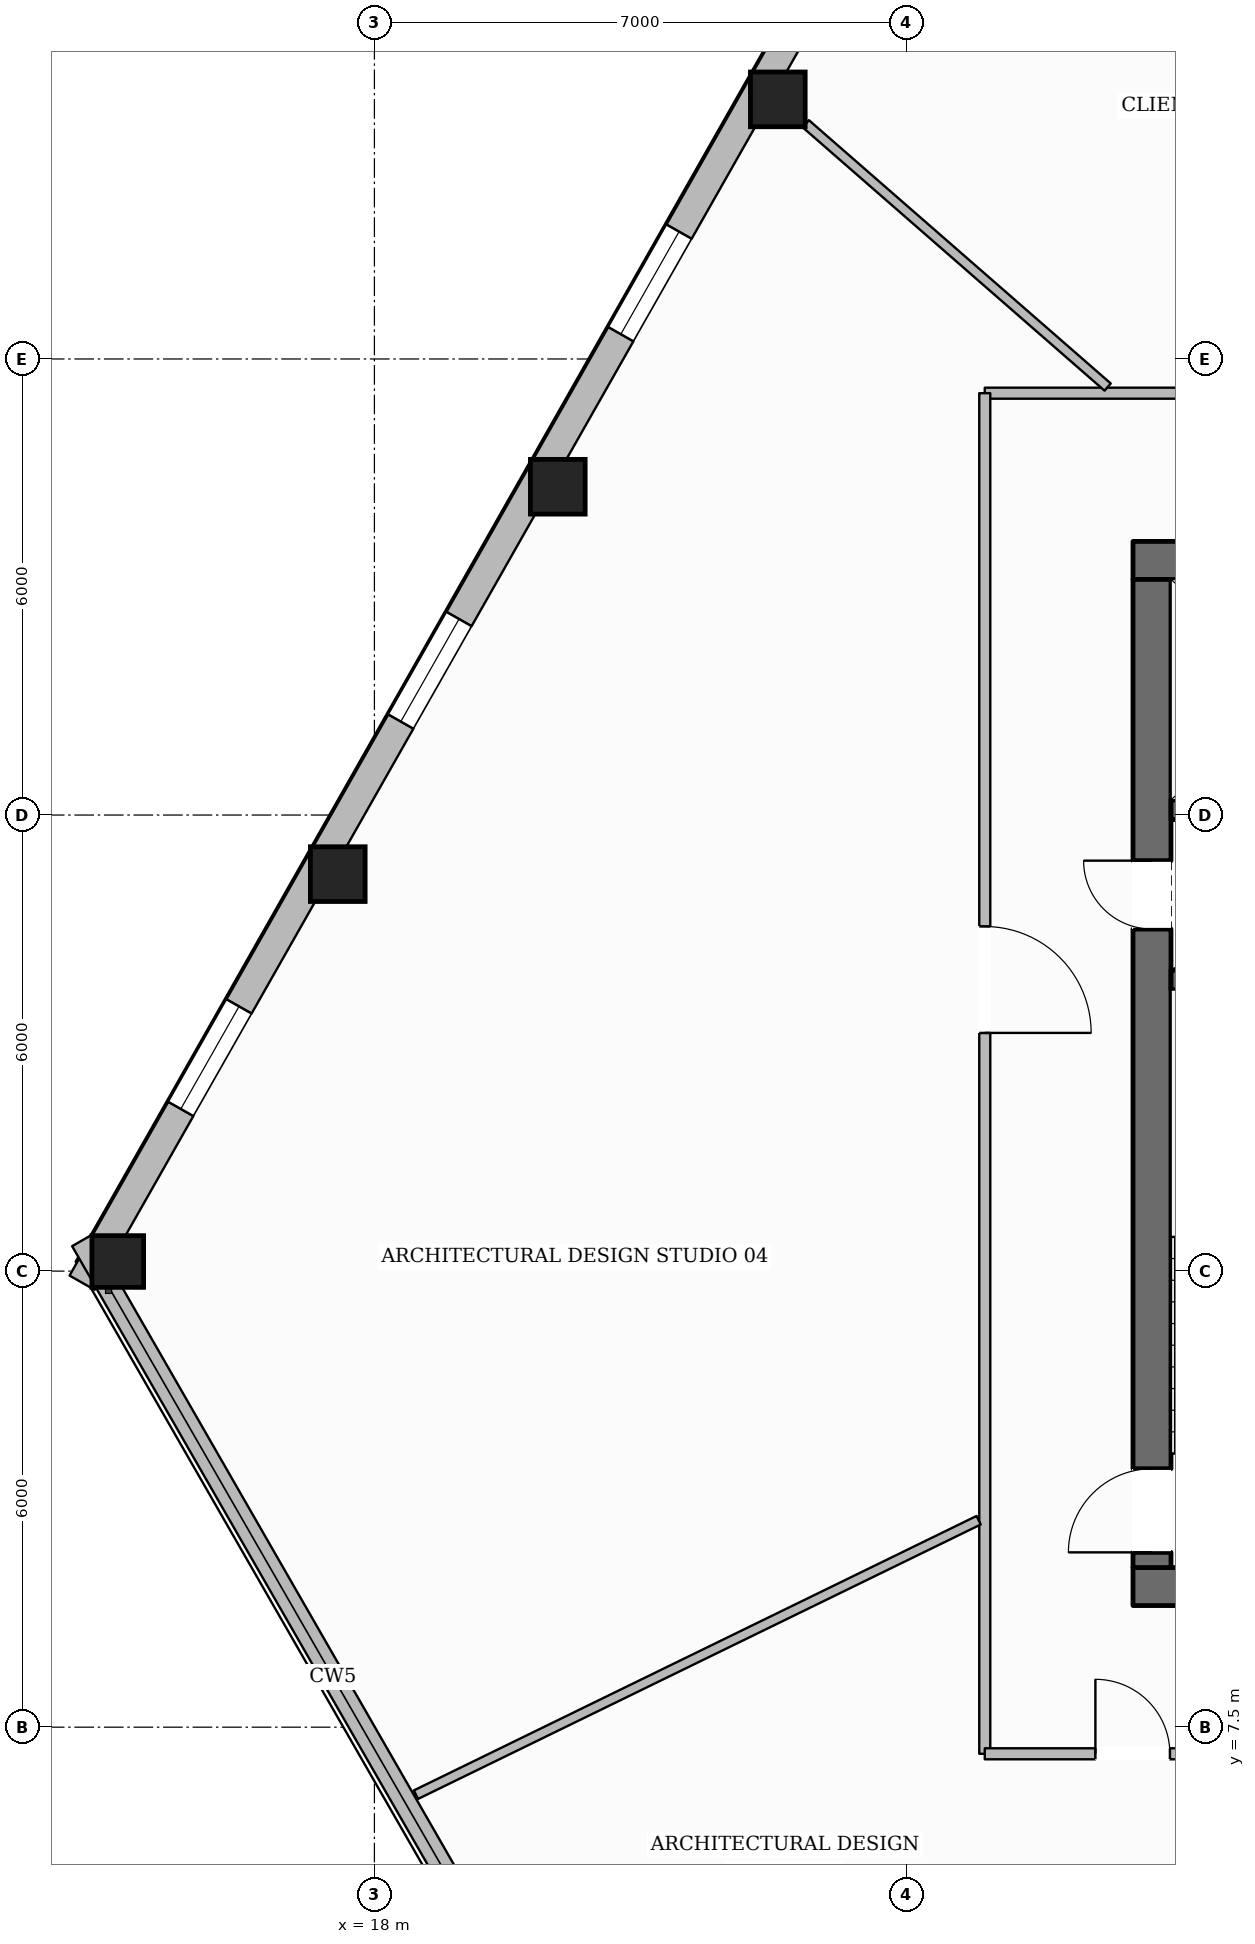
"""IFC4 building model, lengths in metres.
Left out: names, types, materials, properties, quantities, classifications, styles, units other than length and angle.
Written with IfcOpenShell. Run it as: python <this file> out.ifc"""

import sys

from ifc_helpers import new_model, si_unit, direction, frame, frame_2d, origin, origin_2d, place, context, subcontext, project, spatial, rectangle, hollow_rectangle, extrude, element, fill, save


model = new_model("IFC4")
c1 = context("Model", 3, precision=1e-05, world=origin(), true_north=direction((0.0, 1.0)))
c2 = subcontext(c1, "Body", "Model", "MODEL_VIEW")
j1 = project(units=[si_unit("LENGTHUNIT", "METRE"), si_unit("PLANEANGLEUNIT", "RADIAN")], contexts=[c1])
p1 = place(None, origin())
s1 = spatial("IfcSite", under=j1, at=p1, CompositionType="ELEMENT")
p2 = place(p1, origin())
s2 = spatial("IfcBuilding", under=s1, at=p2, CompositionType="ELEMENT")
p3 = place(p2, frame((0.0, 0.0, 100.9)))
s3 = spatial("IfcBuildingStorey", under=s2, at=p3, CompositionType="ELEMENT", Elevation=100.9)
p4 = place(p3, frame((27.98, 9.35, 0.0), z_axis=(0.0, 0.0, 1.0), x_axis=(1.0, 0.0, 0.0)))
e1 = element("IfcWall", 1, at=p4, inside=s3, PredefinedType="SOLIDWALL", context=c2, shape_type="SweptSolid", body=[
    extrude(rectangle(XDim=20.04, YDim=0.5, at=frame_2d((10.02, 0.0))), origin(), (0.0, 0.0, 1.0), 3.6),
])
p5 = place(p4, frame((10.52, 0.0, 0.0)))
e2 = element("IfcOpeningElement", 2, at=p5, cuts=e1, PredefinedType="OPENING", context=c2, shape_type="SweptSolid", body=[
    extrude(rectangle(XDim=1.4, YDim=2.2, at=frame_2d((0.7, 1.1))), frame((0.0, 0.26, 0.0), z_axis=(0.0, -1.0, 0.0), x_axis=(1.0, 0.0, 0.0)), (0.0, 0.0, 1.0), 0.52),
])
p6 = place(p3, frame((27.98, 22.85, 0.0), z_axis=(0.0, 0.0, 1.0), x_axis=(1.0, 0.0, 0.0)))
e3 = element("IfcWall", 3, at=p6, inside=s3, PredefinedType="SOLIDWALL", context=c2, shape_type="SweptSolid", body=[
    extrude(rectangle(XDim=20.04, YDim=0.5, at=frame_2d((10.02, 0.0))), origin(), (0.0, 0.0, 1.0), 3.6),
])
p7 = place(p6, frame((6.295, 0.0, 0.0)))
e4 = element("IfcOpeningElement", 4, at=p7, cuts=e3, PredefinedType="OPENING", context=c2, shape_type="SweptSolid", body=[
    extrude(rectangle(XDim=1.05, YDim=2.15, at=frame_2d((0.525, 1.075))), frame((0.0, 0.26, 0.0), z_axis=(0.0, -1.0, 0.0), x_axis=(1.0, 0.0, 0.0)), (0.0, 0.0, 1.0), 0.52),
])
p8 = place(p6, frame((12.695, 0.0, 0.0)))
e5 = element("IfcOpeningElement", 5, at=p8, cuts=e3, PredefinedType="OPENING", context=c2, shape_type="SweptSolid", body=[
    extrude(rectangle(XDim=1.05, YDim=2.15, at=frame_2d((0.525, 1.075))), frame((0.0, 0.26, 0.0), z_axis=(0.0, -1.0, 0.0), x_axis=(1.0, 0.0, 0.0)), (0.0, 0.0, 1.0), 0.52),
])
p9 = place(p3, frame((28.23, 9.6, 0.0), z_axis=(0.0, 0.0, 1.0), x_axis=(0.0, 1.0, 0.0)))
e6 = element("IfcWall", 6, at=p9, inside=s3, PredefinedType="SOLIDWALL", context=c2, shape_type="SweptSolid", body=[
    extrude(rectangle(XDim=13.0, YDim=0.5, at=frame_2d((6.5, 0.0))), origin(), (0.0, 0.0, 1.0), 3.6),
])
p10 = place(p9, frame((0.2, 0.0, 0.0)))
e7 = element("IfcOpeningElement", 7, at=p10, cuts=e6, PredefinedType="OPENING", context=c2, shape_type="SweptSolid", body=[
    extrude(rectangle(XDim=1.1, YDim=2.15, at=frame_2d((0.55, 1.075))), frame((0.0, 0.26, 0.0), z_axis=(0.0, -1.0, 0.0), x_axis=(1.0, 0.0, 0.0)), (0.0, 0.0, 1.0), 0.52),
])
p11 = place(p9, frame((8.4, 0.0, 0.0)))
e8 = element("IfcOpeningElement", 8, at=p11, cuts=e6, PredefinedType="OPENING", context=c2, shape_type="SweptSolid", body=[
    extrude(rectangle(XDim=0.9, YDim=2.1, at=frame_2d((0.45, 1.05))), frame((0.0, 0.26, 0.0), z_axis=(0.0, -1.0, 0.0), x_axis=(1.0, 0.0, 0.0)), (0.0, 0.0, 1.0), 0.52),
])
for number, where, z_axis, x_axis in (
    (9, (28.48, 17.33, 0.0), (0.0, 0.0, 1.0), (1.0, 0.0, 0.0)),
    (10, (28.48, 19.57, 0.0), (0.0, 0.0, 1.0), (1.0, 0.0, 0.0)),
):
    element("IfcWall", number, at=place(p3, frame(where, z_axis=z_axis, x_axis=x_axis)), inside=s3, PredefinedType="SHEAR", context=c2, shape_type="SweptSolid", body=[
        extrude(rectangle(XDim=3.2, YDim=0.26, at=frame_2d((1.6, 0.0))), origin(), (0.0, 0.0, 1.0), 3.6),
    ])
for number, where, z_axis, x_axis in (
    (11, (23.307, 28.915, 0.0), (0.0, 0.0, 1.0), (1.0, 0.0, 0.0)),
    (12, (20.413, 23.819, 0.0), (0.0, 0.0, 1.0), (1.0, 0.0, 0.0)),
    (13, (17.518, 18.723, 0.0), (0.0, 0.0, 1.0), (1.0, 0.0, 0.0)),
):
    element("IfcColumn", number, at=place(p3, frame(where, z_axis=z_axis, x_axis=x_axis)), inside=s3, PredefinedType="COLUMN", context=c2, shape_type="SweptSolid", body=[
        extrude(hollow_rectangle(XDim=0.72, YDim=0.72, WallThickness=0.032, at=origin_2d()), origin(), (0.0, 0.0, 1.0), 3.6),
    ])
p12 = place(p3, frame((14.624, 13.626, 0.0), z_axis=(0.0, 0.0, 1.0), x_axis=(1.0, 0.0, 0.0)))
e14 = element("IfcColumn", 14, at=p12, inside=s3, PredefinedType="COLUMN", context=c2, shape_type="SweptSolid", body=[
    extrude(hollow_rectangle(XDim=0.68, YDim=0.68, WallThickness=0.03, at=origin_2d()), origin(), (0.0, 0.0, 1.0), 3.6),
])
p13 = place(p3, frame((14.155, 13.347, 0.0), z_axis=(0.0, 0.0, 1.0), x_axis=(0.493868426836, 0.869536644986, 0.0)))
e15 = element("IfcWall", 15, at=p13, inside=s3, PredefinedType="STANDARD", context=c2, shape_type="SweptSolid", body=[
    extrude(rectangle(XDim=36.121, YDim=0.38, at=frame_2d((18.061, 0.0))), origin(), (0.0, 0.0, 1.0), 3.059),
])
p14 = place(p13, frame((31.935, 0.0, 0.65)))
e16 = element("IfcOpeningElement", 16, at=p14, cuts=e15, PredefinedType="OPENING", context=c2, shape_type="SweptSolid", body=[
    extrude(rectangle(XDim=1.55, YDim=1.75, at=frame_2d((0.775, 0.875))), frame((0.0, 0.2, 0.0), z_axis=(0.0, -1.0, 0.0), x_axis=(1.0, 0.0, 0.0)), (0.0, 0.0, 1.0), 0.4),
])
p15 = place(p13, frame((26.073, 0.0, 0.65)))
e17 = element("IfcOpeningElement", 17, at=p15, cuts=e15, PredefinedType="OPENING", context=c2, shape_type="SweptSolid", body=[
    extrude(rectangle(XDim=1.55, YDim=1.75, at=frame_2d((0.775, 0.875))), frame((0.0, 0.2, 0.0), z_axis=(0.0, -1.0, 0.0), x_axis=(1.0, 0.0, 0.0)), (0.0, 0.0, 1.0), 0.4),
])
p16 = place(p13, frame((14.352, 0.0, 0.65)))
e18 = element("IfcOpeningElement", 18, at=p16, cuts=e15, PredefinedType="OPENING", context=c2, shape_type="SweptSolid", body=[
    extrude(rectangle(XDim=1.55, YDim=1.75, at=frame_2d((0.775, 0.875))), frame((0.0, 0.2, 0.0), z_axis=(0.0, -1.0, 0.0), x_axis=(1.0, 0.0, 0.0)), (0.0, 0.0, 1.0), 0.4),
])
p17 = place(p13, frame((8.491, 0.0, 0.65)))
e19 = element("IfcOpeningElement", 19, at=p17, cuts=e15, PredefinedType="OPENING", context=c2, shape_type="SweptSolid", body=[
    extrude(rectangle(XDim=1.55, YDim=1.75, at=frame_2d((0.775, 0.875))), frame((0.0, 0.2, 0.0), z_axis=(0.0, -1.0, 0.0), x_axis=(1.0, 0.0, 0.0)), (0.0, 0.0, 1.0), 0.4),
])
p18 = place(p13, frame((2.63, 0.0, 0.65)))
e20 = element("IfcOpeningElement", 20, at=p18, cuts=e15, PredefinedType="OPENING", context=c2, shape_type="SweptSolid", body=[
    extrude(rectangle(XDim=1.55, YDim=1.75, at=frame_2d((0.775, 0.875))), frame((0.0, 0.2, 0.0), z_axis=(0.0, -1.0, 0.0), x_axis=(1.0, 0.0, 0.0)), (0.0, 0.0, 1.0), 0.4),
])
p19 = place(p3, frame((20.754, 2.419, 0.0), z_axis=(0.0, 0.0, 1.0), x_axis=(-0.49837034912, 0.866964240969, 0.0)))
e21 = element("IfcWall", 21, at=p19, inside=s3, PredefinedType="STANDARD", context=c2, shape_type="SweptSolid", body=[
    extrude(rectangle(XDim=13.246, YDim=0.3, at=frame_2d((6.623, 0.0))), origin(), (0.0, 0.0, 1.0), 3.059),
])
p20 = place(p3, frame((49.97, 25.05, 0.0), z_axis=(0.0, 0.0, 1.0), x_axis=(-1.0, 0.0, 0.0)))
e22 = element("IfcWall", 22, at=p20, inside=s3, PredefinedType="PARTITIONING", context=c2, shape_type="SweptSolid", body=[
    extrude(rectangle(XDim=23.94, YDim=0.145, at=frame_2d((11.97, 0.0))), origin(), (0.0, 0.0, 1.0), 3.6),
])
p21 = place(p20, frame((5.824, 0.0, 0.0)))
e23 = element("IfcOpeningElement", 23, at=p21, cuts=e22, PredefinedType="OPENING", context=c2, shape_type="SweptSolid", body=[
    extrude(rectangle(XDim=1.4, YDim=2.2, at=frame_2d((0.7, 1.1))), frame((0.0, 0.083, 0.0), z_axis=(0.0, -1.0, 0.0), x_axis=(1.0, 0.0, 0.0)), (0.0, 0.0, 1.0), 0.165),
])
p22 = place(p20, frame((16.238, 0.0, 0.0)))
e24 = element("IfcOpeningElement", 24, at=p22, cuts=e22, PredefinedType="OPENING", context=c2, shape_type="SweptSolid", body=[
    extrude(rectangle(XDim=1.4, YDim=2.2, at=frame_2d((0.7, 1.1))), frame((0.0, 0.083, 0.0), z_axis=(0.0, -1.0, 0.0), x_axis=(1.0, 0.0, 0.0)), (0.0, 0.0, 1.0), 0.165),
])
p23 = place(p3, frame((26.03, 25.05, 0.0), z_axis=(0.0, 0.0, 1.0), x_axis=(0.0, -1.0, 0.0)))
e25 = element("IfcWall", 25, at=p23, inside=s3, PredefinedType="PARTITIONING", context=c2, shape_type="SweptSolid", body=[
    extrude(rectangle(XDim=17.9, YDim=0.145, at=frame_2d((8.95, 0.0))), origin(), (0.0, 0.0, 1.0), 3.288),
])
p24 = place(p23, frame((7.016, 0.0, 0.0)))
e26 = element("IfcOpeningElement", 26, at=p24, cuts=e25, PredefinedType="OPENING", context=c2, shape_type="SweptSolid", body=[
    extrude(rectangle(XDim=1.4, YDim=2.2, at=frame_2d((0.7, 1.1))), frame((0.0, 0.083, 0.0), z_axis=(0.0, -1.0, 0.0), x_axis=(1.0, 0.0, 0.0)), (0.0, 0.0, 1.0), 0.165),
])
p25 = place(p3, frame((26.03, 7.15, 0.0), z_axis=(0.0, 0.0, 1.0), x_axis=(1.0, 0.0, 0.0)))
e27 = element("IfcWall", 27, at=p25, inside=s3, PredefinedType="PARTITIONING", context=c2, shape_type="SweptSolid", body=[
    extrude(rectangle(XDim=23.94, YDim=0.145, at=frame_2d((11.97, 0.0))), origin(), (0.0, 0.0, 1.0), 3.6),
])
p26 = place(p25, frame((4.53, 0.0, 0.0)))
e28 = element("IfcOpeningElement", 28, at=p26, cuts=e27, PredefinedType="OPENING", context=c2, shape_type="SweptSolid", body=[
    extrude(rectangle(XDim=0.88, YDim=2.1, at=frame_2d((0.44, 1.05))), frame((0.0, 0.083, 0.0), z_axis=(0.0, -1.0, 0.0), x_axis=(1.0, 0.0, 0.0)), (0.0, 0.0, 1.0), 0.165),
])
p27 = place(p25, frame((7.05, 0.0, 0.0)))
e29 = element("IfcOpeningElement", 29, at=p27, cuts=e27, PredefinedType="OPENING", context=c2, shape_type="SweptSolid", body=[
    extrude(rectangle(XDim=0.88, YDim=2.1, at=frame_2d((0.44, 1.05))), frame((0.0, 0.083, 0.0), z_axis=(0.0, -1.0, 0.0), x_axis=(1.0, 0.0, 0.0)), (0.0, 0.0, 1.0), 0.165),
])
p28 = place(p25, frame((9.43, 0.0, 0.0)))
e30 = element("IfcOpeningElement", 30, at=p28, cuts=e27, PredefinedType="OPENING", context=c2, shape_type="SweptSolid", body=[
    extrude(rectangle(XDim=0.96, YDim=2.1, at=frame_2d((0.48, 1.05))), frame((0.0, 0.083, 0.0), z_axis=(0.0, -1.0, 0.0), x_axis=(1.0, 0.0, 0.0)), (0.0, 0.0, 1.0), 0.165),
])
p29 = place(p25, frame((1.456, 0.0, 0.0)))
e31 = element("IfcOpeningElement", 31, at=p29, cuts=e27, PredefinedType="OPENING", context=c2, shape_type="SweptSolid", body=[
    extrude(rectangle(XDim=0.98, YDim=2.15, at=frame_2d((0.49, 1.075))), frame((0.0, 0.083, 0.0), z_axis=(0.0, -1.0, 0.0), x_axis=(1.0, 0.0, 0.0)), (0.0, 0.0, 1.0), 0.165),
])
p30 = place(p25, frame((16.714, 0.0, 0.0)))
e32 = element("IfcOpeningElement", 32, at=p30, cuts=e27, PredefinedType="OPENING", context=c2, shape_type="SweptSolid", body=[
    extrude(rectangle(XDim=1.4, YDim=2.2, at=frame_2d((0.7, 1.1))), frame((0.0, 0.083, 0.0), z_axis=(0.0, -1.0, 0.0), x_axis=(1.0, 0.0, 0.0)), (0.0, 0.0, 1.0), 0.165),
])
p31 = place(p3, frame((27.646, 25.131, 0.0), z_axis=(0.0, 0.0, 1.0), x_axis=(-0.753603237889, 0.657329567145, 0.0)))
e33 = element("IfcWall", 33, at=p31, inside=s3, PredefinedType="PARTITIONING", context=c2, shape_type="SweptSolid", body=[
    extrude(rectangle(XDim=5.27, YDim=0.125, at=frame_2d((2.635, 0.0))), origin(), (0.0, 0.0, 1.0), 3.141),
])
p32 = place(p3, frame((25.949, 10.223, 0.0), z_axis=(0.0, 0.0, 1.0), x_axis=(-0.898788385453, -0.438382753054, 0.0)))
e34 = element("IfcWall", 34, at=p32, inside=s3, PredefinedType="PARTITIONING", context=c2, shape_type="SweptSolid", body=[
    extrude(rectangle(XDim=8.237, YDim=0.125, at=frame_2d((4.118, 0.0))), origin(), (0.0, 0.0, 1.0), 3.6),
])
p33 = place(p16, origin())
e35 = element("IfcWindow", 35, at=p33, inside=s3, PartitioningType="SINGLE_PANEL", PredefinedType="WINDOW", context=c2, shape_type="SweptSolid", body=[
    extrude(rectangle(XDim=1.55, YDim=1.75, at=frame_2d((0.775, 0.875))), frame((0.0, 0.03, 0.0), z_axis=(0.0, -1.0, 0.0), x_axis=(1.0, 0.0, 0.0)), (0.0, 0.0, 1.0), 0.06),
])
fill(e18, e35)
p34 = place(p17, origin())
e36 = element("IfcWindow", 36, at=p34, inside=s3, PartitioningType="SINGLE_PANEL", PredefinedType="WINDOW", context=c2, shape_type="SweptSolid", body=[
    extrude(rectangle(XDim=1.55, YDim=1.75, at=frame_2d((0.775, 0.875))), frame((0.0, 0.03, 0.0), z_axis=(0.0, -1.0, 0.0), x_axis=(1.0, 0.0, 0.0)), (0.0, 0.0, 1.0), 0.06),
])
fill(e19, e36)
p35 = place(p18, origin())
e37 = element("IfcWindow", 37, at=p35, inside=s3, PartitioningType="SINGLE_PANEL", PredefinedType="WINDOW", context=c2, shape_type="SweptSolid", body=[
    extrude(rectangle(XDim=1.55, YDim=1.75, at=frame_2d((0.775, 0.875))), frame((0.0, 0.03, 0.0), z_axis=(0.0, -1.0, 0.0), x_axis=(1.0, 0.0, 0.0)), (0.0, 0.0, 1.0), 0.06),
])
fill(e20, e37)
p36 = place(p10, origin())
e38 = element("IfcDoor", 38, at=p36, inside=s3, OperationType="SINGLE_SWING_LEFT", PredefinedType="DOOR", context=c2, shape_type="SweptSolid", body=[
    extrude(rectangle(XDim=1.1, YDim=2.15, at=frame_2d((0.55, 1.075))), frame((0.0, 0.025, 0.0), z_axis=(0.0, -1.0, 0.0), x_axis=(1.0, 0.0, 0.0)), (0.0, 0.0, 1.0), 0.05),
])
fill(e7, e38)
p37 = place(p11, origin())
e39 = element("IfcDoor", 39, at=p37, inside=s3, OperationType="SINGLE_SWING_RIGHT", PredefinedType="DOOR", context=c2, shape_type="SweptSolid", body=[
    extrude(rectangle(XDim=0.9, YDim=2.1, at=frame_2d((0.45, 1.05))), frame((0.0, 0.025, 0.0), z_axis=(0.0, -1.0, 0.0), x_axis=(1.0, 0.0, 0.0)), (0.0, 0.0, 1.0), 0.05),
])
fill(e8, e39)
p38 = place(p24, origin())
e40 = element("IfcDoor", 40, at=p38, inside=s3, OperationType="SINGLE_SWING_RIGHT", PredefinedType="DOOR", context=c2, shape_type="SweptSolid", body=[
    extrude(rectangle(XDim=1.4, YDim=2.2, at=frame_2d((0.7, 1.1))), frame((0.0, 0.025, 0.0), z_axis=(0.0, -1.0, 0.0), x_axis=(1.0, 0.0, 0.0)), (0.0, 0.0, 1.0), 0.05),
])
fill(e26, e40)
p39 = place(p29, origin())
e41 = element("IfcDoor", 41, at=p39, inside=s3, OperationType="SINGLE_SWING_LEFT", PredefinedType="DOOR", context=c2, shape_type="SweptSolid", body=[
    extrude(rectangle(XDim=0.98, YDim=2.15, at=frame_2d((0.49, 1.075))), frame((0.0, 0.025, 0.0), z_axis=(0.0, -1.0, 0.0), x_axis=(1.0, 0.0, 0.0)), (0.0, 0.0, 1.0), 0.05),
])
fill(e31, e41)
save(model, sys.argv[1])
